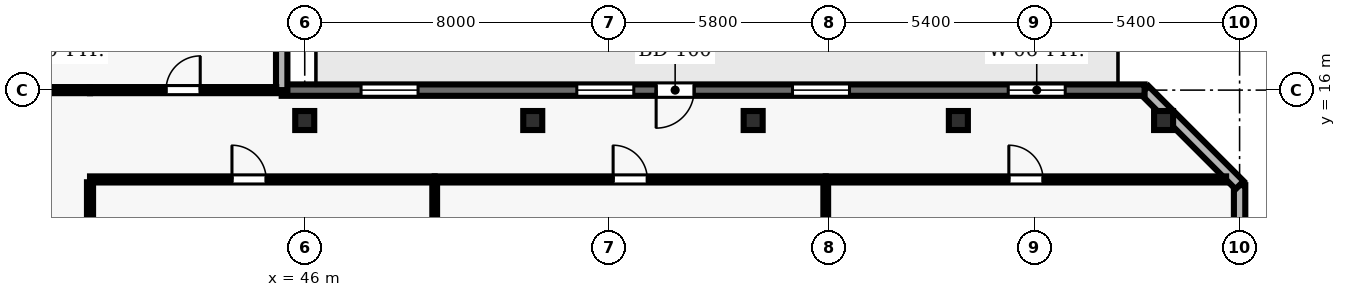
"""IFC4 building model, lengths in metres.
Left out: names, types, materials, properties, quantities, classifications, styles, units other than length and angle.
Written with IfcOpenShell. Run it as: python <this file> out.ifc"""

import sys

from ifc_helpers import new_model, si_unit, direction, frame, frame_2d, origin, origin_2d, place, context, subcontext, project, spatial, rectangle, hollow_rectangle, extrude, element, fill, save


model = new_model("IFC4")
c1 = context("Model", 3, precision=1e-05, world=origin(), true_north=direction((0.0, 1.0)))
c2 = subcontext(c1, "Body", "Model", "MODEL_VIEW")
j1 = project(units=[si_unit("LENGTHUNIT", "METRE"), si_unit("PLANEANGLEUNIT", "RADIAN")], contexts=[c1])
p1 = place(None, origin())
s1 = spatial("IfcSite", under=j1, at=p1, CompositionType="ELEMENT")
p2 = place(p1, origin())
s2 = spatial("IfcBuilding", under=s1, at=p2, CompositionType="ELEMENT")
p3 = place(p2, frame((0.0, 0.0, 154.1)))
s3 = spatial("IfcBuildingStorey", under=s2, at=p3, CompositionType="ELEMENT", Elevation=154.1)
for number, where, z_axis, x_axis in (
    (1, (46.0, 15.2, 0.0), (0.0, 0.0, 1.0), (1.0, 0.0, 0.0)),
    (2, (52.0, 15.2, 0.0), (0.0, 0.0, 1.0), (1.0, 0.0, 0.0)),
    (3, (57.8, 15.2, 0.0), (0.0, 0.0, 1.0), (1.0, 0.0, 0.0)),
    (4, (63.2, 15.2, 0.0), (0.0, 0.0, 1.0), (1.0, 0.0, 0.0)),
    (5, (68.6, 15.2, 0.0), (0.0, 0.0, 1.0), (1.0, 0.0, 0.0)),
):
    element("IfcColumn", number, at=place(p3, frame(where, z_axis=z_axis, x_axis=x_axis)), inside=s3, PredefinedType="COLUMN", context=c2, shape_type="SweptSolid", body=[
        extrude(hollow_rectangle(XDim=0.5, YDim=0.5, WallThickness=0.025, at=origin_2d()), origin(), (0.0, 0.0, 1.0), 3.9),
    ])
p4 = place(p3, frame((70.6, 2.5, 0.0), z_axis=(0.0, 0.0, 1.0), x_axis=(0.0, 1.0, 0.0)))
e6 = element("IfcWall", 6, at=p4, inside=s3, PredefinedType="SOLIDWALL", context=c2, shape_type="SweptSolid", body=[
    extrude(rectangle(XDim=11.0, YDim=0.3, at=frame_2d((5.5, 0.0))), origin(), (0.0, 0.0, 1.0), 3.69),
])
p5 = place(p4, frame((1.7, 0.0, 0.9)))
e7 = element("IfcOpeningElement", 7, at=p5, cuts=e6, PredefinedType="OPENING", context=c2, shape_type="SweptSolid", body=[
    extrude(rectangle(XDim=2.1, YDim=1.6, at=frame_2d((1.05, 0.8))), frame((0.0, 0.16, 0.0), z_axis=(0.0, -1.0, 0.0), x_axis=(1.0, 0.0, 0.0)), (0.0, 0.0, 1.0), 0.32),
])
p6 = place(p4, frame((7.2, 0.0, 0.9)))
e8 = element("IfcOpeningElement", 8, at=p6, cuts=e6, PredefinedType="OPENING", context=c2, shape_type="SweptSolid", body=[
    extrude(rectangle(XDim=2.1, YDim=1.6, at=frame_2d((1.05, 0.8))), frame((0.0, 0.16, 0.0), z_axis=(0.0, -1.0, 0.0), x_axis=(1.0, 0.0, 0.0)), (0.0, 0.0, 1.0), 0.32),
])
p7 = place(p3, frame((70.6, 13.5, 0.0), z_axis=(0.0, 0.0, 1.0), x_axis=(-0.707106781187, 0.707106781187, 0.0)))
e9 = element("IfcWall", 9, at=p7, inside=s3, PredefinedType="SOLIDWALL", context=c2, shape_type="SweptSolid", body=[
    extrude(rectangle(XDim=3.536, YDim=0.3, at=frame_2d((1.768, 0.0))), origin(), (0.0, 0.0, 1.0), 3.69),
])
p8 = place(p3, frame((68.1, 16.0, 0.0), z_axis=(0.0, 0.0, 1.0), x_axis=(-1.0, 0.0, 0.0)))
e10 = element("IfcWall", 10, at=p8, inside=s3, PredefinedType="SOLIDWALL", context=c2, shape_type="SweptSolid", body=[
    extrude(rectangle(XDim=22.706, YDim=0.3, at=frame_2d((11.353, 0.0))), origin(), (0.0, 0.0, 1.0), 3.69),
])
p9 = place(p8, frame((11.853, 0.0, 0.0)))
e11 = element("IfcOpeningElement", 11, at=p9, cuts=e10, PredefinedType="OPENING", context=c2, shape_type="SweptSolid", body=[
    extrude(rectangle(XDim=1.0, YDim=2.2, at=frame_2d((0.5, 1.1))), frame((0.0, 0.16, 0.0), z_axis=(0.0, -1.0, 0.0), x_axis=(1.0, 0.0, 0.0)), (0.0, 0.0, 1.0), 0.32),
])
p10 = place(p8, frame((2.088, 0.0, 0.9)))
e12 = element("IfcOpeningElement", 12, at=p10, cuts=e10, PredefinedType="OPENING", context=c2, shape_type="SweptSolid", body=[
    extrude(rectangle(XDim=1.5, YDim=1.8, at=frame_2d((0.75, 0.9))), frame((0.0, 0.16, 0.0), z_axis=(0.0, -1.0, 0.0), x_axis=(1.0, 0.0, 0.0)), (0.0, 0.0, 1.0), 0.32),
])
p11 = place(p8, frame((7.765, 0.0, 0.9)))
e13 = element("IfcOpeningElement", 13, at=p11, cuts=e10, PredefinedType="OPENING", context=c2, shape_type="SweptSolid", body=[
    extrude(rectangle(XDim=1.5, YDim=1.8, at=frame_2d((0.75, 0.9))), frame((0.0, 0.16, 0.0), z_axis=(0.0, -1.0, 0.0), x_axis=(1.0, 0.0, 0.0)), (0.0, 0.0, 1.0), 0.32),
])
p12 = place(p8, frame((13.441, 0.0, 0.9)))
e14 = element("IfcOpeningElement", 14, at=p12, cuts=e10, PredefinedType="OPENING", context=c2, shape_type="SweptSolid", body=[
    extrude(rectangle(XDim=1.5, YDim=1.8, at=frame_2d((0.75, 0.9))), frame((0.0, 0.16, 0.0), z_axis=(0.0, -1.0, 0.0), x_axis=(1.0, 0.0, 0.0)), (0.0, 0.0, 1.0), 0.32),
])
p13 = place(p8, frame((19.118, 0.0, 0.9)))
e15 = element("IfcOpeningElement", 15, at=p13, cuts=e10, PredefinedType="OPENING", context=c2, shape_type="SweptSolid", body=[
    extrude(rectangle(XDim=1.5, YDim=1.8, at=frame_2d((0.75, 0.9))), frame((0.0, 0.16, 0.0), z_axis=(0.0, -1.0, 0.0), x_axis=(1.0, 0.0, 0.0)), (0.0, 0.0, 1.0), 0.32),
])
p14 = place(p3, frame((45.394, 16.0, 0.0), z_axis=(0.0, 0.0, 1.0), x_axis=(0.0, 1.0, 0.0)))
e16 = element("IfcWall", 16, at=p14, inside=s3, PredefinedType="SOLIDWALL", context=c2, shape_type="SweptSolid", body=[
    extrude(rectangle(XDim=6.35, YDim=0.3, at=frame_2d((3.175, 0.0))), origin(), (0.0, 0.0, 1.0), 3.69),
])
p15 = place(p14, frame((2.275, 0.0, 0.9)))
e17 = element("IfcOpeningElement", 17, at=p15, cuts=e16, PredefinedType="OPENING", context=c2, shape_type="SweptSolid", body=[
    extrude(rectangle(XDim=1.8, YDim=1.8, at=frame_2d((0.9, 0.9))), frame((0.0, 0.16, 0.0), z_axis=(0.0, -1.0, 0.0), x_axis=(1.0, 0.0, 0.0)), (0.0, 0.0, 1.0), 0.32),
])
p16 = place(p3, frame((40.35, 13.65, 0.0), z_axis=(0.0, 0.0, 1.0), x_axis=(1.0, 0.0, 0.0)))
e18 = element("IfcWall", 18, at=p16, inside=s3, PredefinedType="PARTITIONING", context=c2, shape_type="SweptSolid", body=[
    extrude(rectangle(XDim=9.07, YDim=0.16, at=frame_2d((4.535, 0.0))), origin(), (0.0, 0.0, 1.0), 3.69),
])
p17 = place(p16, frame((3.735, 0.0, 0.0)))
e19 = element("IfcOpeningElement", 19, at=p17, cuts=e18, PredefinedType="OPENING", context=c2, shape_type="SweptSolid", body=[
    extrude(rectangle(XDim=0.9, YDim=2.1, at=frame_2d((0.45, 1.05))), frame((0.0, 0.09, 0.0), z_axis=(0.0, -1.0, 0.0), x_axis=(1.0, 0.0, 0.0)), (0.0, 0.0, 1.0), 0.18),
])
p18 = place(p3, frame((40.35, 16.0, 0.0), z_axis=(0.0, 0.0, 1.0), x_axis=(-1.0, 0.0, 0.0)))
e20 = element("IfcWall", 20, at=p18, inside=s3, PredefinedType="PARTITIONING", context=c2, shape_type="SweptSolid", body=[
    extrude(rectangle(XDim=2.3, YDim=0.16, at=frame_2d((1.15, 0.0))), origin(), (0.0, 0.0, 1.0), 3.69),
])
p19 = place(p3, frame((40.35, 16.0, 0.0), z_axis=(0.0, 0.0, 1.0), x_axis=(1.0, 0.0, 0.0)))
e21 = element("IfcWall", 21, at=p19, inside=s3, PredefinedType="PARTITIONING", context=c2, shape_type="SweptSolid", body=[
    extrude(rectangle(XDim=4.899, YDim=0.16, at=frame_2d((2.449, 0.0))), origin(), (0.0, 0.0, 1.0), 3.69),
])
p20 = place(p19, frame((2.0, 0.0, 0.0)))
e22 = element("IfcOpeningElement", 22, at=p20, cuts=e21, PredefinedType="OPENING", context=c2, shape_type="SweptSolid", body=[
    extrude(rectangle(XDim=0.9, YDim=2.1, at=frame_2d((0.45, 1.05))), frame((0.0, 0.09, 0.0), z_axis=(0.0, -1.0, 0.0), x_axis=(1.0, 0.0, 0.0)), (0.0, 0.0, 1.0), 0.18),
])
p21 = place(p3, frame((49.42, 13.65, 0.0), z_axis=(0.0, 0.0, 1.0), x_axis=(1.0, 0.0, 0.0)))
e23 = element("IfcWall", 23, at=p21, inside=s3, PredefinedType="PARTITIONING", context=c2, shape_type="SweptSolid", body=[
    extrude(rectangle(XDim=10.29, YDim=0.16, at=frame_2d((5.145, 0.0))), origin(), (0.0, 0.0, 1.0), 3.69),
])
p22 = place(p21, frame((4.695, 0.0, 0.0)))
e24 = element("IfcOpeningElement", 24, at=p22, cuts=e23, PredefinedType="OPENING", context=c2, shape_type="SweptSolid", body=[
    extrude(rectangle(XDim=0.9, YDim=2.1, at=frame_2d((0.45, 1.05))), frame((0.0, 0.09, 0.0), z_axis=(0.0, -1.0, 0.0), x_axis=(1.0, 0.0, 0.0)), (0.0, 0.0, 1.0), 0.18),
])
p23 = place(p3, frame((59.71, 13.65, 0.0), z_axis=(0.0, 0.0, 1.0), x_axis=(1.0, 0.0, 0.0)))
e25 = element("IfcWall", 25, at=p23, inside=s3, PredefinedType="PARTITIONING", context=c2, shape_type="SweptSolid", body=[
    extrude(rectangle(XDim=10.535, YDim=0.16, at=frame_2d((5.268, 0.0))), origin(), (0.0, 0.0, 1.0), 3.69),
])
p24 = place(p23, frame((4.818, 0.0, 0.0)))
e26 = element("IfcOpeningElement", 26, at=p24, cuts=e25, PredefinedType="OPENING", context=c2, shape_type="SweptSolid", body=[
    extrude(rectangle(XDim=0.9, YDim=2.1, at=frame_2d((0.45, 1.05))), frame((0.0, 0.09, 0.0), z_axis=(0.0, -1.0, 0.0), x_axis=(1.0, 0.0, 0.0)), (0.0, 0.0, 1.0), 0.18),
])
p25 = place(p3, frame((40.35, 8.008, 0.0), z_axis=(0.0, 0.0, 1.0), x_axis=(0.0, 1.0, 0.0)))
e27 = element("IfcWall", 27, at=p25, inside=s3, PredefinedType="PARTITIONING", context=c2, shape_type="SweptSolid", body=[
    extrude(rectangle(XDim=5.567, YDim=0.16, at=frame_2d((2.783, 0.0))), origin(), (0.0, 0.0, 1.0), 3.69),
])
for number, where, z_axis, x_axis in (
    (28, (49.42, 8.008, 0.0), (0.0, 0.0, 1.0), (0.0, 1.0, 0.0)),
    (29, (59.71, 8.008, 0.0), (0.0, 0.0, 1.0), (0.0, 1.0, 0.0)),
):
    element("IfcWall", number, at=place(p3, frame(where, z_axis=z_axis, x_axis=x_axis)), inside=s3, PredefinedType="PARTITIONING", context=c2, shape_type="SweptSolid", body=[
        extrude(rectangle(XDim=5.567, YDim=0.125, at=frame_2d((2.783, 0.0))), origin(), (0.0, 0.0, 1.0), 3.69),
    ])
p26 = place(p9, origin())
e30 = element("IfcDoor", 30, at=p26, inside=s3, OperationType="SINGLE_SWING_RIGHT", PredefinedType="DOOR", context=c2, shape_type="SweptSolid", body=[
    extrude(rectangle(XDim=1.0, YDim=2.2, at=frame_2d((0.5, 1.1))), frame((0.0, 0.025, 0.0), z_axis=(0.0, -1.0, 0.0), x_axis=(1.0, 0.0, 0.0)), (0.0, 0.0, 1.0), 0.05),
])
fill(e11, e30)
p27 = place(p10, origin())
e31 = element("IfcWindow", 31, at=p27, inside=s3, PartitioningType="SINGLE_PANEL", PredefinedType="WINDOW", context=c2, shape_type="SweptSolid", body=[
    extrude(rectangle(XDim=1.5, YDim=1.8, at=frame_2d((0.75, 0.9))), frame((0.0, 0.03, 0.0), z_axis=(0.0, -1.0, 0.0), x_axis=(1.0, 0.0, 0.0)), (0.0, 0.0, 1.0), 0.06),
])
fill(e12, e31)
p28 = place(p11, origin())
e32 = element("IfcWindow", 32, at=p28, inside=s3, PartitioningType="SINGLE_PANEL", PredefinedType="WINDOW", context=c2, shape_type="SweptSolid", body=[
    extrude(rectangle(XDim=1.5, YDim=1.8, at=frame_2d((0.75, 0.9))), frame((0.0, 0.03, 0.0), z_axis=(0.0, -1.0, 0.0), x_axis=(1.0, 0.0, 0.0)), (0.0, 0.0, 1.0), 0.06),
])
fill(e13, e32)
p29 = place(p12, origin())
e33 = element("IfcWindow", 33, at=p29, inside=s3, PartitioningType="SINGLE_PANEL", PredefinedType="WINDOW", context=c2, shape_type="SweptSolid", body=[
    extrude(rectangle(XDim=1.5, YDim=1.8, at=frame_2d((0.75, 0.9))), frame((0.0, 0.03, 0.0), z_axis=(0.0, -1.0, 0.0), x_axis=(1.0, 0.0, 0.0)), (0.0, 0.0, 1.0), 0.06),
])
fill(e14, e33)
p30 = place(p13, origin())
e34 = element("IfcWindow", 34, at=p30, inside=s3, PartitioningType="SINGLE_PANEL", PredefinedType="WINDOW", context=c2, shape_type="SweptSolid", body=[
    extrude(rectangle(XDim=1.5, YDim=1.8, at=frame_2d((0.75, 0.9))), frame((0.0, 0.03, 0.0), z_axis=(0.0, -1.0, 0.0), x_axis=(1.0, 0.0, 0.0)), (0.0, 0.0, 1.0), 0.06),
])
fill(e15, e34)
p31 = place(p17, origin())
e35 = element("IfcDoor", 35, at=p31, inside=s3, OperationType="SINGLE_SWING_LEFT", PredefinedType="DOOR", context=c2, shape_type="SweptSolid", body=[
    extrude(rectangle(XDim=0.9, YDim=2.1, at=frame_2d((0.45, 1.05))), frame((0.0, 0.025, 0.0), z_axis=(0.0, -1.0, 0.0), x_axis=(1.0, 0.0, 0.0)), (0.0, 0.0, 1.0), 0.05),
])
fill(e19, e35)
p32 = place(p22, origin())
e36 = element("IfcDoor", 36, at=p32, inside=s3, OperationType="SINGLE_SWING_LEFT", PredefinedType="DOOR", context=c2, shape_type="SweptSolid", body=[
    extrude(rectangle(XDim=0.9, YDim=2.1, at=frame_2d((0.45, 1.05))), frame((0.0, 0.025, 0.0), z_axis=(0.0, -1.0, 0.0), x_axis=(1.0, 0.0, 0.0)), (0.0, 0.0, 1.0), 0.05),
])
fill(e24, e36)
p33 = place(p24, origin())
e37 = element("IfcDoor", 37, at=p33, inside=s3, OperationType="SINGLE_SWING_LEFT", PredefinedType="DOOR", context=c2, shape_type="SweptSolid", body=[
    extrude(rectangle(XDim=0.9, YDim=2.1, at=frame_2d((0.45, 1.05))), frame((0.0, 0.025, 0.0), z_axis=(0.0, -1.0, 0.0), x_axis=(1.0, 0.0, 0.0)), (0.0, 0.0, 1.0), 0.05),
])
fill(e26, e37)
p34 = place(p20, origin())
e38 = element("IfcDoor", 38, at=p34, inside=s3, OperationType="SINGLE_SWING_RIGHT", PredefinedType="DOOR", context=c2, shape_type="SweptSolid", body=[
    extrude(rectangle(XDim=0.9, YDim=2.1, at=frame_2d((0.45, 1.05))), frame((0.0, 0.025, 0.0), z_axis=(0.0, -1.0, 0.0), x_axis=(1.0, 0.0, 0.0)), (0.0, 0.0, 1.0), 0.05),
])
fill(e22, e38)
save(model, sys.argv[1])
